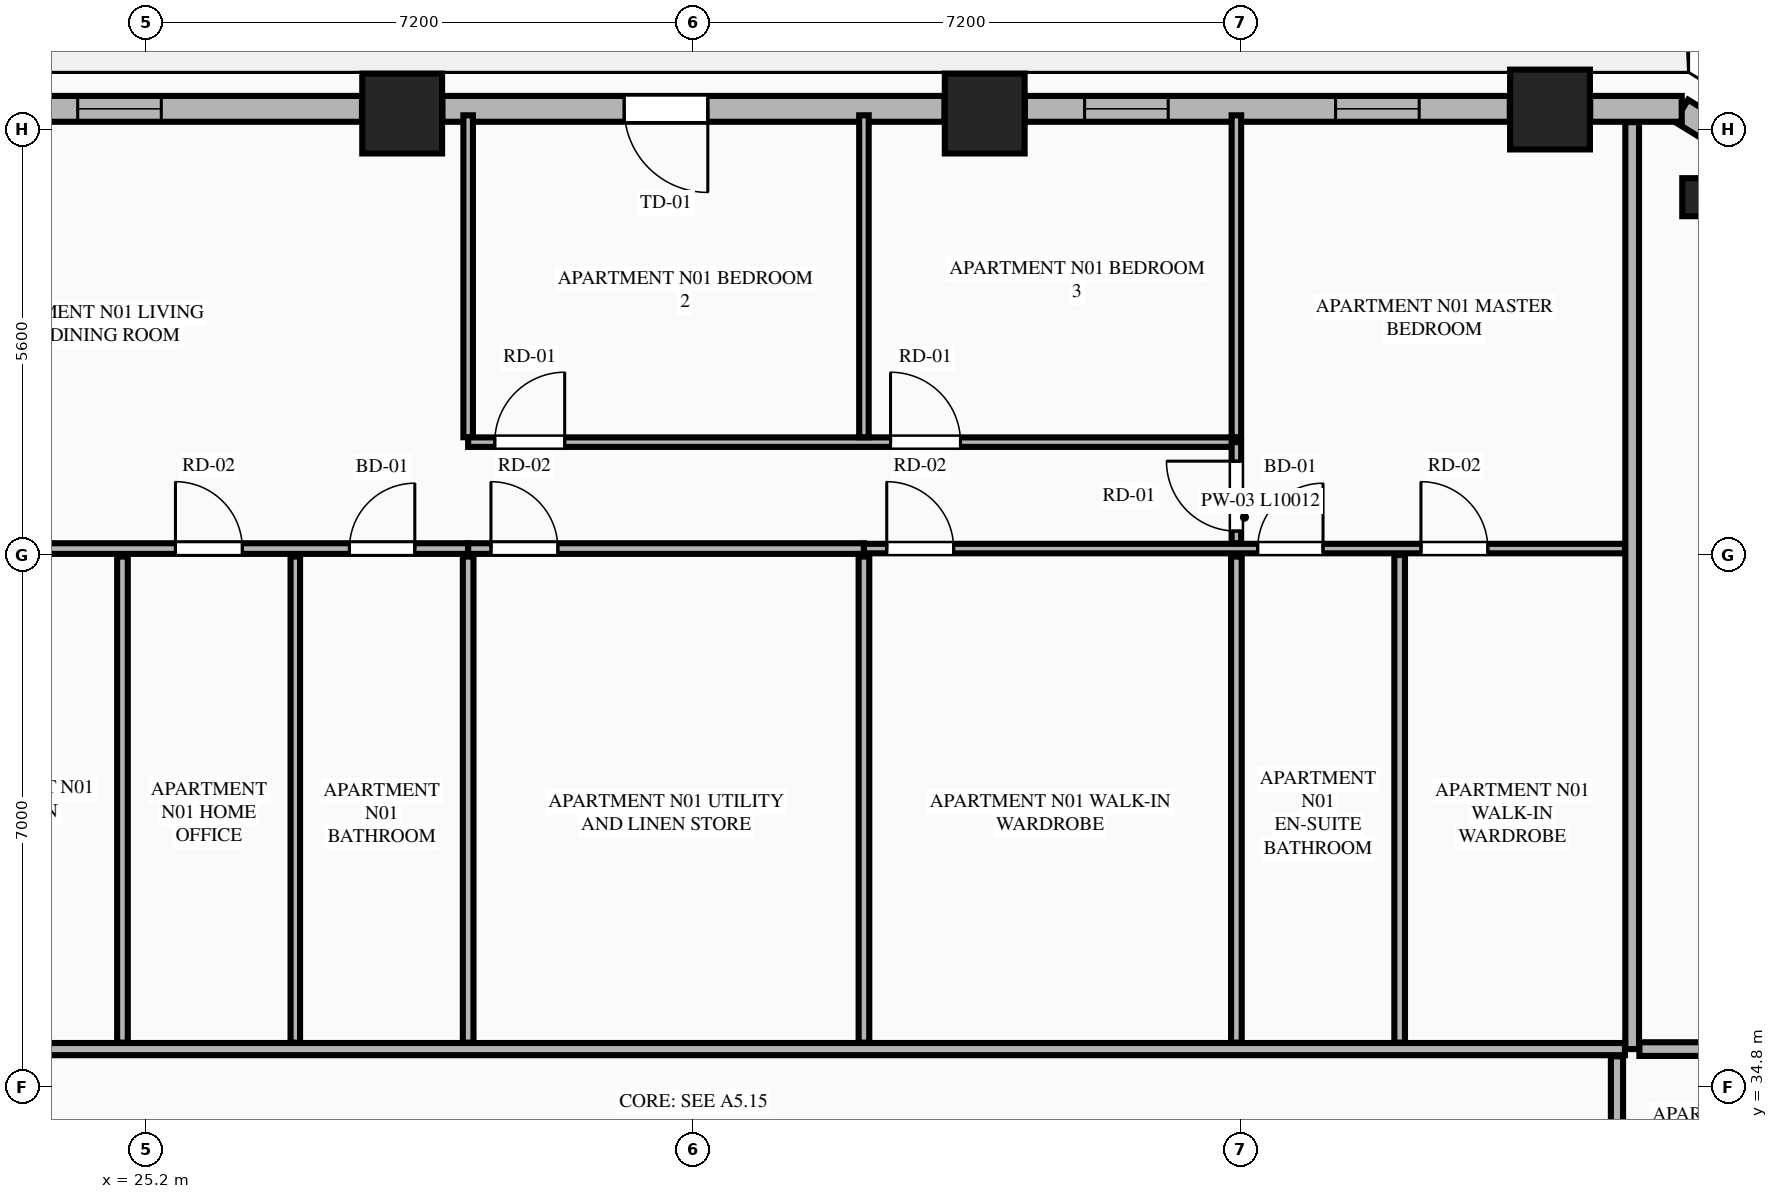
"""IFC4 building model, lengths in metres.
Left out: names, types, materials, properties, quantities, classifications, styles, units other than length and angle.
Written with IfcOpenShell. Run it as: python <this file> out.ifc"""

import sys

from ifc_helpers import new_model, si_unit, direction, frame, frame_2d, origin, origin_2d, place, context, subcontext, project, spatial, rectangle, extrude, element, fill, save


model = new_model("IFC4")
c1 = context("Model", 3, precision=1e-05, world=origin(), true_north=direction((0.0, 1.0)))
c2 = subcontext(c1, "Body", "Model", "MODEL_VIEW")
j1 = project(units=[si_unit("LENGTHUNIT", "METRE"), si_unit("PLANEANGLEUNIT", "RADIAN")], contexts=[c1])
p1 = place(None, origin())
s1 = spatial("IfcSite", under=j1, at=p1, CompositionType="ELEMENT")
p2 = place(p1, origin())
s2 = spatial("IfcBuilding", under=s1, at=p2, CompositionType="ELEMENT")
p3 = place(p2, frame((0.0, 0.0, 116.15)))
s3 = spatial("IfcBuildingStorey", under=s2, at=p3, CompositionType="ELEMENT", Elevation=116.15)
for number, where, z_axis, x_axis in (
    (1, (43.669, 47.661, 0.0), (0.0, 0.0, 1.0), (1.0, 0.0, 0.0)),
    (2, (36.232, 47.608, 0.0), (0.0, 0.0, 1.0), (1.0, 0.0, 0.0)),
    (3, (28.568, 47.608, 0.0), (0.0, 0.0, 1.0), (1.0, 0.0, 0.0)),
):
    element("IfcColumn", number, at=place(p3, frame(where, z_axis=z_axis, x_axis=x_axis)), inside=s3, PredefinedType="COLUMN", context=c2, shape_type="SweptSolid", body=[
        extrude(rectangle(XDim=1.05, YDim=1.05, at=origin_2d()), origin(), (0.0, 0.0, 1.0), 3.55),
    ])
p4 = place(p3, frame((45.659, 46.508, 0.0), z_axis=(0.0, 0.0, 1.0), x_axis=(-0.865160173452, 0.501495637342, 0.0)))
e4 = element("IfcColumn", 4, at=p4, inside=s3, PredefinedType="PILASTER", context=c2, shape_type="SweptSolid", body=[
    extrude(rectangle(XDim=0.5, YDim=0.35, at=origin_2d()), origin(), (0.0, 0.0, 1.0), 3.55),
])
p5 = place(p3, frame((46.971, 46.677, 0.0), z_axis=(0.0, 0.0, 1.0), x_axis=(-0.851798915137, 0.523868884523, 0.0)))
e5 = element("IfcWall", 5, at=p5, inside=s3, PredefinedType="STANDARD", context=c2, shape_type="SweptSolid", body=[
    extrude(rectangle(XDim=1.848, YDim=0.34, at=frame_2d((0.924, 0.0))), origin(), (0.0, 0.0, 1.0), 3.34),
])
p6 = place(p3, frame((45.402, 47.67, 0.0), z_axis=(0.0, 0.0, 1.0), x_axis=(-1.0, 0.0, 0.0)))
e6 = element("IfcWall", 6, at=p6, inside=s3, PredefinedType="STANDARD", context=c2, shape_type="SweptSolid", body=[
    extrude(rectangle(XDim=1.204, YDim=0.34, at=frame_2d((0.602, 0.0))), origin(), (0.0, 0.0, 1.0), 3.34),
])
p7 = place(p3, frame((43.14, 47.67, 0.0), z_axis=(0.0, 0.0, 1.0), x_axis=(-1.0, 0.0, 0.0)))
e7 = element("IfcWall", 7, at=p7, inside=s3, PredefinedType="STANDARD", context=c2, shape_type="SweptSolid", body=[
    extrude(rectangle(XDim=6.379, YDim=0.34, at=frame_2d((3.189, 0.0))), origin(), (0.0, 0.0, 1.0), 2.797),
])
p8 = place(p7, frame((1.192, 0.0, 0.75)))
e8 = element("IfcOpeningElement", 8, at=p8, cuts=e7, PredefinedType="OPENING", context=c2, shape_type="SweptSolid", body=[
    extrude(rectangle(XDim=1.1, YDim=1.897, at=frame_2d((0.55, 0.948))), frame((0.0, 0.18, 0.0), z_axis=(0.0, -1.0, 0.0), x_axis=(1.0, 0.0, 0.0)), (0.0, 0.0, 1.0), 0.36),
])
p9 = place(p7, frame((4.494, 0.0, 0.75)))
e9 = element("IfcOpeningElement", 9, at=p9, cuts=e7, PredefinedType="OPENING", context=c2, shape_type="SweptSolid", body=[
    extrude(rectangle(XDim=1.1, YDim=1.897, at=frame_2d((0.55, 0.948))), frame((0.0, 0.18, 0.0), z_axis=(0.0, -1.0, 0.0), x_axis=(1.0, 0.0, 0.0)), (0.0, 0.0, 1.0), 0.36),
])
p10 = place(p3, frame((35.703, 47.67, 0.0), z_axis=(0.0, 0.0, 1.0), x_axis=(-1.0, 0.0, 0.0)))
e10 = element("IfcWall", 10, at=p10, inside=s3, PredefinedType="STANDARD", context=c2, shape_type="SweptSolid", body=[
    extrude(rectangle(XDim=6.606, YDim=0.34, at=frame_2d((3.303, 0.0))), origin(), (0.0, 0.0, 1.0), 2.797),
])
p11 = place(p10, frame((3.114, 0.0, 0.0)))
e11 = element("IfcOpeningElement", 11, at=p11, cuts=e10, PredefinedType="OPENING", context=c2, shape_type="SweptSolid", body=[
    extrude(rectangle(XDim=1.1, YDim=2.25, at=frame_2d((0.55, 1.125))), frame((0.0, 0.18, 0.0), z_axis=(0.0, -1.0, 0.0), x_axis=(1.0, 0.0, 0.0)), (0.0, 0.0, 1.0), 0.36),
])
p12 = place(p3, frame((28.039, 47.67, 0.0), z_axis=(0.0, 0.0, 1.0), x_axis=(-1.0, 0.0, 0.0)))
e12 = element("IfcWall", 12, at=p12, inside=s3, PredefinedType="STANDARD", context=c2, shape_type="SweptSolid", body=[
    extrude(rectangle(XDim=6.379, YDim=0.34, at=frame_2d((3.189, 0.0))), origin(), (0.0, 0.0, 1.0), 2.797),
])
p13 = place(p12, frame((2.64, 0.0, 0.75)))
e13 = element("IfcOpeningElement", 13, at=p13, cuts=e12, PredefinedType="OPENING", context=c2, shape_type="SweptSolid", body=[
    extrude(rectangle(XDim=1.1, YDim=1.897, at=frame_2d((0.55, 0.948))), frame((0.0, 0.18, 0.0), z_axis=(0.0, -1.0, 0.0), x_axis=(1.0, 0.0, 0.0)), (0.0, 0.0, 1.0), 0.36),
])
p14 = place(p3, frame((44.75, 35.3, 0.0), z_axis=(0.0, 0.0, 1.0), x_axis=(0.0, 1.0, 0.0)))
e14 = element("IfcWall", 14, at=p14, inside=s3, PredefinedType="PARTITIONING", context=c2, shape_type="SweptSolid", body=[
    extrude(rectangle(XDim=12.195, YDim=0.18, at=frame_2d((6.098, 0.0))), origin(), (0.0, 0.0, 1.0), 3.34),
])
p15 = place(p3, frame((20.145, 35.3, 0.0), z_axis=(0.0, 0.0, 1.0), x_axis=(1.0, 0.0, 0.0)))
e15 = element("IfcWall", 15, at=p15, inside=s3, PredefinedType="PARTITIONING", context=c2, shape_type="SweptSolid", body=[
    extrude(rectangle(XDim=24.51, YDim=0.16, at=frame_2d((12.255, 0.0))), origin(), (0.0, 0.0, 1.0), 3.34),
])
p16 = place(p15, frame((0.405, 0.0, 0.0)))
e16 = element("IfcOpeningElement", 16, at=p16, cuts=e15, PredefinedType="OPENING", context=c2, shape_type="SweptSolid", body=[
    extrude(rectangle(XDim=1.35, YDim=2.35, at=frame_2d((0.675, 1.175))), frame((0.0, 0.09, 0.0), z_axis=(0.0, -1.0, 0.0), x_axis=(1.0, 0.0, 0.0)), (0.0, 0.0, 1.0), 0.18),
])
p17 = place(p3, frame((22.1, 41.885, 0.0), z_axis=(0.0, 0.0, 1.0), x_axis=(1.0, 0.0, 0.0)))
e17 = element("IfcWall", 17, at=p17, inside=s3, PredefinedType="PLUMBINGWALL", context=c2, shape_type="SweptSolid", body=[
    extrude(rectangle(XDim=7.336, YDim=0.14, at=frame_2d((3.668, 0.0))), origin(), (0.0, 0.0, 1.0), 3.34),
])
p18 = place(p17, frame((5.774, 0.0, 0.0)))
e18 = element("IfcOpeningElement", 18, at=p18, cuts=e17, PredefinedType="OPENING", context=c2, shape_type="SweptSolid", body=[
    extrude(rectangle(XDim=0.86, YDim=2.1, at=frame_2d((0.43, 1.05))), frame((0.0, 0.08, 0.0), z_axis=(0.0, -1.0, 0.0), x_axis=(1.0, 0.0, 0.0)), (0.0, 0.0, 1.0), 0.16),
])
p19 = place(p17, frame((0.26, 0.0, 0.0)))
e19 = element("IfcOpeningElement", 19, at=p19, cuts=e17, PredefinedType="OPENING", context=c2, shape_type="SweptSolid", body=[
    extrude(rectangle(XDim=0.88, YDim=2.15, at=frame_2d((0.44, 1.075))), frame((0.0, 0.08, 0.0), z_axis=(0.0, -1.0, 0.0), x_axis=(1.0, 0.0, 0.0)), (0.0, 0.0, 1.0), 0.16),
])
p20 = place(p17, frame((3.485, 0.0, 0.0)))
e20 = element("IfcOpeningElement", 20, at=p20, cuts=e17, PredefinedType="OPENING", context=c2, shape_type="SweptSolid", body=[
    extrude(rectangle(XDim=0.88, YDim=2.15, at=frame_2d((0.44, 1.075))), frame((0.0, 0.08, 0.0), z_axis=(0.0, -1.0, 0.0), x_axis=(1.0, 0.0, 0.0)), (0.0, 0.0, 1.0), 0.16),
])
p21 = place(p3, frame((29.436, 41.885, 0.0), z_axis=(0.0, 0.0, 1.0), x_axis=(1.0, 0.0, 0.0)))
e21 = element("IfcWall", 21, at=p21, inside=s3, PredefinedType="PLUMBINGWALL", context=c2, shape_type="SweptSolid", body=[
    extrude(rectangle(XDim=5.207, YDim=0.14, at=frame_2d((2.604, 0.0))), origin(), (0.0, 0.0, 1.0), 3.34),
])
p22 = place(p21, frame((0.3, 0.0, 0.0)))
e22 = element("IfcOpeningElement", 22, at=p22, cuts=e21, PredefinedType="OPENING", context=c2, shape_type="SweptSolid", body=[
    extrude(rectangle(XDim=0.88, YDim=2.15, at=frame_2d((0.44, 1.075))), frame((0.0, 0.08, 0.0), z_axis=(0.0, -1.0, 0.0), x_axis=(1.0, 0.0, 0.0)), (0.0, 0.0, 1.0), 0.16),
])
p23 = place(p3, frame((34.643, 41.885, 0.0), z_axis=(0.0, 0.0, 1.0), x_axis=(1.0, 0.0, 0.0)))
e23 = element("IfcWall", 23, at=p23, inside=s3, PredefinedType="PARTITIONING", context=c2, shape_type="SweptSolid", body=[
    extrude(rectangle(XDim=10.012, YDim=0.125, at=frame_2d((5.006, 0.0))), origin(), (0.0, 0.0, 1.0), 3.34),
])
p24 = place(p23, frame((5.18, 0.0, 0.0)))
e24 = element("IfcOpeningElement", 24, at=p24, cuts=e23, PredefinedType="OPENING", context=c2, shape_type="SweptSolid", body=[
    extrude(rectangle(XDim=0.86, YDim=2.1, at=frame_2d((0.43, 1.05))), frame((0.0, 0.073, 0.0), z_axis=(0.0, -1.0, 0.0), x_axis=(1.0, 0.0, 0.0)), (0.0, 0.0, 1.0), 0.145),
])
p25 = place(p23, frame((7.328, 0.0, 0.0)))
e25 = element("IfcOpeningElement", 25, at=p25, cuts=e23, PredefinedType="OPENING", context=c2, shape_type="SweptSolid", body=[
    extrude(rectangle(XDim=0.88, YDim=2.15, at=frame_2d((0.44, 1.075))), frame((0.0, 0.073, 0.0), z_axis=(0.0, -1.0, 0.0), x_axis=(1.0, 0.0, 0.0)), (0.0, 0.0, 1.0), 0.145),
])
p26 = place(p23, frame((0.3, 0.0, 0.0)))
e26 = element("IfcOpeningElement", 26, at=p26, cuts=e23, PredefinedType="OPENING", context=c2, shape_type="SweptSolid", body=[
    extrude(rectangle(XDim=0.88, YDim=2.15, at=frame_2d((0.44, 1.075))), frame((0.0, 0.073, 0.0), z_axis=(0.0, -1.0, 0.0), x_axis=(1.0, 0.0, 0.0)), (0.0, 0.0, 1.0), 0.145),
])
p27 = place(p3, frame((24.888, 35.385, 0.0), z_axis=(0.0, 0.0, 1.0), x_axis=(0.0, 1.0, 0.0)))
e27 = element("IfcWall", 27, at=p27, inside=s3, PredefinedType="PLUMBINGWALL", context=c2, shape_type="SweptSolid", body=[
    extrude(rectangle(XDim=6.395, YDim=0.14, at=frame_2d((3.198, 0.0))), origin(), (0.0, 0.0, 1.0), 3.34),
])
p28 = place(p3, frame((27.162, 35.385, 0.0), z_axis=(0.0, 0.0, 1.0), x_axis=(0.0, 1.0, 0.0)))
e28 = element("IfcWall", 28, at=p28, inside=s3, PredefinedType="PARTITIONING", context=c2, shape_type="SweptSolid", body=[
    extrude(rectangle(XDim=6.395, YDim=0.125, at=frame_2d((3.198, 0.0))), origin(), (0.0, 0.0, 1.0), 3.34),
])
p29 = place(p3, frame((29.436, 43.35, 0.0), z_axis=(0.0, 0.0, 1.0), x_axis=(0.0, 1.0, 0.0)))
e29 = element("IfcWall", 29, at=p29, inside=s3, PredefinedType="PARTITIONING", context=c2, shape_type="SweptSolid", body=[
    extrude(rectangle(XDim=4.235, YDim=0.125, at=frame_2d((2.117, 0.0))), origin(), (0.0, 0.0, 1.0), 3.34),
])
p30 = place(p3, frame((29.436, 43.285, 0.0), z_axis=(0.0, 0.0, 1.0), x_axis=(1.0, 0.0, 0.0)))
e30 = element("IfcWall", 30, at=p30, inside=s3, PredefinedType="PARTITIONING", context=c2, shape_type="SweptSolid", body=[
    extrude(rectangle(XDim=10.107, YDim=0.125, at=frame_2d((5.053, 0.0))), origin(), (0.0, 0.0, 1.0), 3.34),
])
p31 = place(p30, frame((0.35, 0.0, 0.0)))
e31 = element("IfcOpeningElement", 31, at=p31, cuts=e30, PredefinedType="OPENING", context=c2, shape_type="SweptSolid", body=[
    extrude(rectangle(XDim=0.92, YDim=2.15, at=frame_2d((0.46, 1.075))), frame((0.0, 0.073, 0.0), z_axis=(0.0, -1.0, 0.0), x_axis=(1.0, 0.0, 0.0)), (0.0, 0.0, 1.0), 0.145),
])
p32 = place(p30, frame((5.557, 0.0, 0.0)))
e32 = element("IfcOpeningElement", 32, at=p32, cuts=e30, PredefinedType="OPENING", context=c2, shape_type="SweptSolid", body=[
    extrude(rectangle(XDim=0.92, YDim=2.15, at=frame_2d((0.46, 1.075))), frame((0.0, 0.073, 0.0), z_axis=(0.0, -1.0, 0.0), x_axis=(1.0, 0.0, 0.0)), (0.0, 0.0, 1.0), 0.145),
])
p33 = place(p3, frame((39.543, 41.955, 0.0), z_axis=(0.0, 0.0, 1.0), x_axis=(0.0, 1.0, 0.0)))
e33 = element("IfcWall", 33, at=p33, inside=s3, PredefinedType="PARTITIONING", context=c2, shape_type="SweptSolid", body=[
    extrude(rectangle(XDim=1.33, YDim=0.125, at=frame_2d((0.665, 0.0))), origin(), (0.0, 0.0, 1.0), 3.34),
])
p34 = place(p33, frame((0.16, 0.0, 0.0)))
e34 = element("IfcOpeningElement", 34, at=p34, cuts=e33, PredefinedType="OPENING", context=c2, shape_type="SweptSolid", body=[
    extrude(rectangle(XDim=0.92, YDim=2.15, at=frame_2d((0.46, 1.075))), frame((0.0, 0.073, 0.0), z_axis=(0.0, -1.0, 0.0), x_axis=(1.0, 0.0, 0.0)), (0.0, 0.0, 1.0), 0.145),
])
for number, where, z_axis, x_axis in (
    (35, (29.436, 35.385, 0.0), (0.0, 0.0, 1.0), (0.0, 1.0, 0.0)),
    (36, (34.643, 35.385, 0.0), (0.0, 0.0, 1.0), (0.0, 1.0, 0.0)),
):
    element("IfcWall", number, at=place(p3, frame(where, z_axis=z_axis, x_axis=x_axis)), inside=s3, PredefinedType="PLUMBINGWALL", context=c2, shape_type="SweptSolid", body=[
        extrude(rectangle(XDim=6.395, YDim=0.14, at=frame_2d((3.198, 0.0))), origin(), (0.0, 0.0, 1.0), 3.34),
    ])
for number, where, z_axis, x_axis in (
    (37, (34.643, 43.35, 0.0), (0.0, 0.0, 1.0), (0.0, 1.0, 0.0)),
    (38, (39.543, 43.35, 0.0), (0.0, 0.0, 1.0), (0.0, 1.0, 0.0)),
):
    element("IfcWall", number, at=place(p3, frame(where, z_axis=z_axis, x_axis=x_axis)), inside=s3, PredefinedType="PARTITIONING", context=c2, shape_type="SweptSolid", body=[
        extrude(rectangle(XDim=4.235, YDim=0.125, at=frame_2d((2.117, 0.0))), origin(), (0.0, 0.0, 1.0), 3.34),
    ])
p35 = place(p3, frame((39.543, 35.385, 0.0), z_axis=(0.0, 0.0, 1.0), x_axis=(0.0, 1.0, 0.0)))
e39 = element("IfcWall", 39, at=p35, inside=s3, PredefinedType="PLUMBINGWALL", context=c2, shape_type="SweptSolid", body=[
    extrude(rectangle(XDim=6.395, YDim=0.14, at=frame_2d((3.198, 0.0))), origin(), (0.0, 0.0, 1.0), 3.34),
])
p36 = place(p3, frame((41.691, 35.385, 0.0), z_axis=(0.0, 0.0, 1.0), x_axis=(0.0, 1.0, 0.0)))
e40 = element("IfcWall", 40, at=p36, inside=s3, PredefinedType="PLUMBINGWALL", context=c2, shape_type="SweptSolid", body=[
    extrude(rectangle(XDim=6.415, YDim=0.14, at=frame_2d((3.208, 0.0))), origin(), (0.0, 0.0, 1.0), 2.722),
])
p37 = place(p3, frame((44.845, 35.3, 0.0), z_axis=(0.0, 0.0, 1.0), x_axis=(1.0, 0.0, 0.0)))
e41 = element("IfcWall", 41, at=p37, inside=s3, PredefinedType="PARTITIONING", context=c2, shape_type="SweptSolid", body=[
    extrude(rectangle(XDim=7.669, YDim=0.18, at=frame_2d((3.834, 0.0))), origin(), (0.0, 0.0, 1.0), 3.34),
])
p38 = place(p3, frame((44.55, 16.595, 0.0), z_axis=(0.0, 0.0, 1.0), x_axis=(0.0, 1.0, 0.0)))
e42 = element("IfcWall", 42, at=p38, inside=s3, PredefinedType="PARTITIONING", context=c2, shape_type="SweptSolid", body=[
    extrude(rectangle(XDim=18.61, YDim=0.16, at=frame_2d((9.305, 0.0))), origin(), (0.0, 0.0, 1.0), 3.34),
])
p39 = place(p38, frame((0.45, 0.0, 0.0)))
e43 = element("IfcOpeningElement", 43, at=p39, cuts=e42, PredefinedType="OPENING", context=c2, shape_type="SweptSolid", body=[
    extrude(rectangle(XDim=1.02, YDim=2.25, at=frame_2d((0.51, 1.125))), frame((0.0, 0.09, 0.0), z_axis=(0.0, -1.0, 0.0), x_axis=(1.0, 0.0, 0.0)), (0.0, 0.0, 1.0), 0.18),
])
p40 = place(p8, origin())
e44 = element("IfcWindow", 44, at=p40, inside=s3, PartitioningType="SINGLE_PANEL", PredefinedType="WINDOW", context=c2, shape_type="SweptSolid", body=[
    extrude(rectangle(XDim=1.1, YDim=1.897, at=frame_2d((0.55, 0.948))), frame((0.0, 0.03, 0.0), z_axis=(0.0, -1.0, 0.0), x_axis=(1.0, 0.0, 0.0)), (0.0, 0.0, 1.0), 0.06),
])
fill(e8, e44)
p41 = place(p11, origin())
e45 = element("IfcDoor", 45, at=p41, inside=s3, OperationType="SINGLE_SWING_LEFT", PredefinedType="DOOR", context=c2, shape_type="SweptSolid", body=[
    extrude(rectangle(XDim=1.1, YDim=2.25, at=frame_2d((0.55, 1.125))), frame((0.0, 0.025, 0.0), z_axis=(0.0, -1.0, 0.0), x_axis=(1.0, 0.0, 0.0)), (0.0, 0.0, 1.0), 0.05),
])
fill(e11, e45)
p42 = place(p13, origin())
e46 = element("IfcWindow", 46, at=p42, inside=s3, PartitioningType="SINGLE_PANEL", PredefinedType="WINDOW", context=c2, shape_type="SweptSolid", body=[
    extrude(rectangle(XDim=1.1, YDim=1.897, at=frame_2d((0.55, 0.948))), frame((0.0, 0.03, 0.0), z_axis=(0.0, -1.0, 0.0), x_axis=(1.0, 0.0, 0.0)), (0.0, 0.0, 1.0), 0.06),
])
fill(e13, e46)
p43 = place(p18, origin())
e47 = element("IfcDoor", 47, at=p43, inside=s3, OperationType="SINGLE_SWING_RIGHT", PredefinedType="DOOR", context=c2, shape_type="SweptSolid", body=[
    extrude(rectangle(XDim=0.86, YDim=2.1, at=frame_2d((0.43, 1.05))), frame((0.0, 0.025, 0.0), z_axis=(0.0, -1.0, 0.0), x_axis=(1.0, 0.0, 0.0)), (0.0, 0.0, 1.0), 0.05),
])
fill(e18, e47)
p44 = place(p24, origin())
e48 = element("IfcDoor", 48, at=p44, inside=s3, OperationType="SINGLE_SWING_RIGHT", PredefinedType="DOOR", context=c2, shape_type="SweptSolid", body=[
    extrude(rectangle(XDim=0.86, YDim=2.1, at=frame_2d((0.43, 1.05))), frame((0.0, 0.025, 0.0), z_axis=(0.0, -1.0, 0.0), x_axis=(1.0, 0.0, 0.0)), (0.0, 0.0, 1.0), 0.05),
])
fill(e24, e48)
p45 = place(p25, origin())
e49 = element("IfcDoor", 49, at=p45, inside=s3, OperationType="SINGLE_SWING_LEFT", PredefinedType="DOOR", context=c2, shape_type="SweptSolid", body=[
    extrude(rectangle(XDim=0.88, YDim=2.15, at=frame_2d((0.44, 1.075))), frame((0.0, 0.025, 0.0), z_axis=(0.0, -1.0, 0.0), x_axis=(1.0, 0.0, 0.0)), (0.0, 0.0, 1.0), 0.05),
])
fill(e25, e49)
p46 = place(p20, origin())
e50 = element("IfcDoor", 50, at=p46, inside=s3, OperationType="SINGLE_SWING_LEFT", PredefinedType="DOOR", context=c2, shape_type="SweptSolid", body=[
    extrude(rectangle(XDim=0.88, YDim=2.15, at=frame_2d((0.44, 1.075))), frame((0.0, 0.025, 0.0), z_axis=(0.0, -1.0, 0.0), x_axis=(1.0, 0.0, 0.0)), (0.0, 0.0, 1.0), 0.05),
])
fill(e20, e50)
p47 = place(p22, origin())
e51 = element("IfcDoor", 51, at=p47, inside=s3, OperationType="SINGLE_SWING_LEFT", PredefinedType="DOOR", context=c2, shape_type="SweptSolid", body=[
    extrude(rectangle(XDim=0.88, YDim=2.15, at=frame_2d((0.44, 1.075))), frame((0.0, 0.025, 0.0), z_axis=(0.0, -1.0, 0.0), x_axis=(1.0, 0.0, 0.0)), (0.0, 0.0, 1.0), 0.05),
])
fill(e22, e51)
p48 = place(p31, origin())
e52 = element("IfcDoor", 52, at=p48, inside=s3, OperationType="SINGLE_SWING_RIGHT", PredefinedType="DOOR", context=c2, shape_type="SweptSolid", body=[
    extrude(rectangle(XDim=0.92, YDim=2.15, at=frame_2d((0.46, 1.075))), frame((0.0, 0.025, 0.0), z_axis=(0.0, -1.0, 0.0), x_axis=(1.0, 0.0, 0.0)), (0.0, 0.0, 1.0), 0.05),
])
fill(e31, e52)
p49 = place(p32, origin())
e53 = element("IfcDoor", 53, at=p49, inside=s3, OperationType="SINGLE_SWING_LEFT", PredefinedType="DOOR", context=c2, shape_type="SweptSolid", body=[
    extrude(rectangle(XDim=0.92, YDim=2.15, at=frame_2d((0.46, 1.075))), frame((0.0, 0.025, 0.0), z_axis=(0.0, -1.0, 0.0), x_axis=(1.0, 0.0, 0.0)), (0.0, 0.0, 1.0), 0.05),
])
fill(e32, e53)
p50 = place(p34, origin())
e54 = element("IfcDoor", 54, at=p50, inside=s3, OperationType="SINGLE_SWING_RIGHT", PredefinedType="DOOR", context=c2, shape_type="SweptSolid", body=[
    extrude(rectangle(XDim=0.92, YDim=2.15, at=frame_2d((0.46, 1.075))), frame((0.0, 0.025, 0.0), z_axis=(0.0, -1.0, 0.0), x_axis=(1.0, 0.0, 0.0)), (0.0, 0.0, 1.0), 0.05),
])
fill(e34, e54)
p51 = place(p26, origin())
e55 = element("IfcDoor", 55, at=p51, inside=s3, OperationType="SINGLE_SWING_LEFT", PredefinedType="DOOR", context=c2, shape_type="SweptSolid", body=[
    extrude(rectangle(XDim=0.88, YDim=2.15, at=frame_2d((0.44, 1.075))), frame((0.0, 0.025, 0.0), z_axis=(0.0, -1.0, 0.0), x_axis=(1.0, 0.0, 0.0)), (0.0, 0.0, 1.0), 0.05),
])
fill(e26, e55)
p52 = place(p9, origin())
e56 = element("IfcWindow", 56, at=p52, inside=s3, PartitioningType="SINGLE_PANEL", PredefinedType="WINDOW", context=c2, shape_type="SweptSolid", body=[
    extrude(rectangle(XDim=1.1, YDim=1.897, at=frame_2d((0.55, 0.948))), frame((0.0, 0.03, 0.0), z_axis=(0.0, -1.0, 0.0), x_axis=(1.0, 0.0, 0.0)), (0.0, 0.0, 1.0), 0.06),
])
fill(e9, e56)
save(model, sys.argv[1])
